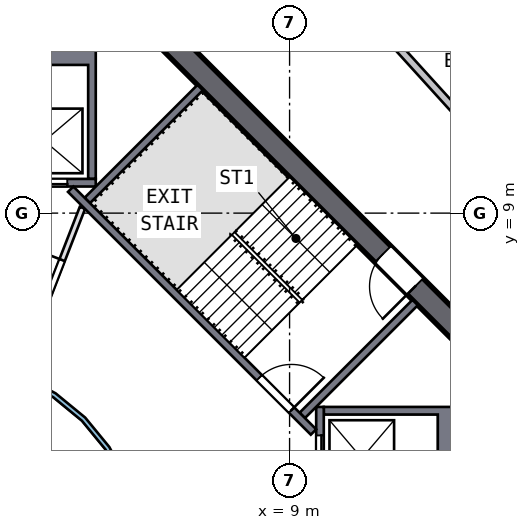
"""IFC4 building model, lengths in metres.
Left out: names, types, materials, properties, quantities, classifications, styles, units other than length and angle.
Written with IfcOpenShell. Run it as: python <this file> out.ifc"""

import sys

from ifc_helpers import new_model, si_unit, direction, frame, frame_2d, origin, place, context, subcontext, project, spatial, polyline, rectangle, outline, extrude, element, fill, save


model = new_model("IFC4")
c1 = context("Model", 3, precision=1e-05, world=origin(), true_north=direction((0.0, 1.0)))
c2 = subcontext(c1, "Body", "Model", "MODEL_VIEW")
j1 = project(units=[si_unit("LENGTHUNIT", "METRE"), si_unit("PLANEANGLEUNIT", "RADIAN")], contexts=[c1])
p1 = place(None, origin())
s1 = spatial("IfcSite", under=j1, at=p1, CompositionType="ELEMENT")
p2 = place(p1, origin())
s2 = spatial("IfcBuilding", under=s1, at=p2, CompositionType="ELEMENT")
p3 = place(p2, frame((0.0, 0.0, 205.5)))
s3 = spatial("IfcBuildingStorey", under=s2, at=p3, CompositionType="ELEMENT", Elevation=205.5)
p4 = place(p3, frame((13.788, 5.587, 0.0), z_axis=(0.0, 0.0, 1.0), x_axis=(-0.707106781, 0.707106781, 0.0)))
e1 = element("IfcWall", 1, at=p4, inside=s3, PredefinedType="SHEAR", context=c2, shape_type="SweptSolid", body=[
    extrude(rectangle(XDim=11.598, YDim=0.6, at=frame_2d((5.799, 0.0))), origin(), (0.0, 0.0, 1.0), 3.5),
])
p5 = place(p4, frame((2.099, 0.0, 0.0)))
e2 = element("IfcOpeningElement", 2, at=p5, cuts=e1, PredefinedType="OPENING", context=c2, shape_type="SweptSolid", body=[
    extrude(rectangle(XDim=1.2, YDim=2.1, at=frame_2d((0.6, 1.05))), frame((0.0, 0.31, 0.0), z_axis=(0.0, -1.0, 0.0), x_axis=(1.0, 0.0, 0.0)), (0.0, 0.0, 1.0), 0.62),
])
p6 = place(p3, origin())
e3 = element("IfcWall", 3, at=p6, inside=s3, PredefinedType="SOLIDWALL", context=c2, shape_type="SweptSolid", body=[
    extrude(outline(polyline([(13.4, 3.9), (13.4, 1.2), (9.9, 1.2), (9.9, 1.4), (12.9, 1.4), (12.9, 3.7), (9.9, 3.7), (9.9, 3.9), (13.4, 3.9)])), origin(), (0.0, 0.0, 1.0), 3.19),
])
p7 = place(p3, frame((9.8, 1.2, 0.0), z_axis=(0.0, 0.0, 1.0), x_axis=(0.0, 1.0, 0.0)))
e4 = element("IfcWall", 4, at=p7, inside=s3, PredefinedType="SOLIDWALL", context=c2, shape_type="SweptSolid", body=[
    extrude(rectangle(XDim=2.7, YDim=0.2, at=frame_2d((1.35, 0.0))), origin(), (0.0, 0.0, 1.0), 3.19),
])
p8 = place(p7, frame((0.75, 0.0, 0.0)))
e5 = element("IfcOpeningElement", 5, at=p8, cuts=e4, PredefinedType="OPENING", context=c2, shape_type="SweptSolid", body=[
    extrude(rectangle(XDim=1.2, YDim=2.1, at=frame_2d((0.6, 1.05))), frame((0.0, 0.11, 0.0), z_axis=(0.0, -1.0, 0.0), x_axis=(1.0, 0.0, 0.0)), (0.0, 0.0, 1.0), 0.22),
])
p9 = place(p3, origin())
e6 = element("IfcWall", 6, at=p9, inside=s3, PredefinedType="SOLIDWALL", context=c2, shape_type="SweptSolid", body=[
    extrude(outline(polyline([(3.9, 9.9), (3.7, 9.9), (3.7, 12.9), (1.4, 12.9), (1.4, 9.9), (1.2, 9.9), (1.2, 13.4), (3.9, 13.4), (3.9, 9.9)])), origin(), (0.0, 0.0, 1.0), 3.19),
])
p10 = place(p3, frame((1.2, 9.8, 0.0), z_axis=(0.0, 0.0, 1.0), x_axis=(1.0, 0.0, 0.0)))
e7 = element("IfcWall", 7, at=p10, inside=s3, PredefinedType="SOLIDWALL", context=c2, shape_type="SweptSolid", body=[
    extrude(rectangle(XDim=2.7, YDim=0.2, at=frame_2d((1.35, 0.0))), origin(), (0.0, 0.0, 1.0), 3.19),
])
p11 = place(p10, frame((0.75, 0.0, 0.0)))
e8 = element("IfcOpeningElement", 8, at=p11, cuts=e7, PredefinedType="OPENING", context=c2, shape_type="SweptSolid", body=[
    extrude(rectangle(XDim=1.2, YDim=2.1, at=frame_2d((0.6, 1.05))), frame((0.0, 0.11, 0.0), z_axis=(0.0, -1.0, 0.0), x_axis=(1.0, 0.0, 0.0)), (0.0, 0.0, 1.0), 0.22),
])
p12 = place(p3, frame((3.24, 9.629, 0.0), z_axis=(0.0, 0.0, 1.0), x_axis=(0.707106781, -0.707106781, 0.0)))
e9 = element("IfcWall", 9, at=p12, inside=s3, PredefinedType="SOLIDWALL", context=c2, shape_type="SweptSolid", body=[
    extrude(rectangle(XDim=9.036, YDim=0.2, at=frame_2d((4.518, 0.0))), origin(), (0.0, 0.0, 1.0), 3.19),
])
p13 = place(p12, frame((7.018, 0.0, 0.0)))
e10 = element("IfcOpeningElement", 10, at=p13, cuts=e9, PredefinedType="OPENING", context=c2, shape_type="SweptSolid", body=[
    extrude(rectangle(XDim=1.2, YDim=2.1, at=frame_2d((0.6, 1.05))), frame((0.0, 0.11, 0.0), z_axis=(0.0, -1.0, 0.0), x_axis=(1.0, 0.0, 0.0)), (0.0, 0.0, 1.0), 0.22),
])
for number, where, z_axis, x_axis in (
    (11, (9.334, 3.677, 0.0), (0.0, 0.0, 1.0), (0.707, 0.707, 0.0)),
    (12, (3.677, 9.334, 0.0), (0.0, 0.0, 1.0), (0.707, 0.707, 0.0)),
):
    element("IfcWall", number, at=place(p3, frame(where, z_axis=z_axis, x_axis=x_axis)), inside=s3, PredefinedType="SOLIDWALL", context=c2, shape_type="SweptSolid", body=[
        extrude(rectangle(XDim=4.2, YDim=0.2, at=frame_2d((2.1, 0.0))), origin(), (0.0, 0.0, 1.0), 3.19),
    ])
p14 = place(p3, frame((1.857, 4.782, 0.0), z_axis=(0.0, 0.0, 1.0), x_axis=(0.362053096, 0.932157474, 0.0)))
e13 = element("IfcWall", 13, at=p14, inside=s3, PredefinedType="PARTITIONING", context=c2, shape_type="SweptSolid", body=[
    extrude(rectangle(XDim=4.675, YDim=0.15, at=frame_2d((2.337, 0.0))), origin(), (0.0, 0.0, 1.0), 3.19),
])
p15 = place(p14, frame((1.4, 0.0, 0.0)))
e14 = element("IfcOpeningElement", 14, at=p15, cuts=e13, PredefinedType="OPENING", context=c2, shape_type="SweptSolid", body=[
    extrude(rectangle(XDim=1.8, YDim=2.1, at=frame_2d((0.9, 1.05))), frame((0.0, 0.085, 0.0), z_axis=(0.0, -1.0, 0.0), x_axis=(1.0, 0.0, 0.0)), (0.0, 0.0, 1.0), 0.17),
])
p16 = place(p3, origin())
e15 = element("IfcWall", 15, at=p16, inside=s3, PredefinedType="SOLIDWALL", context=c2, shape_type="SweptSolid", body=[
    extrude(outline(polyline([(5.021, -0.999), (4.73, -1.959), (4.257, -2.844), (3.62, -3.62), (2.844, -4.257), (1.959, -4.73), (0.999, -5.021), (0.0, -5.12), (-0.999, -5.021), (-1.959, -4.73), (-2.844, -4.257), (-3.62, -3.62), (-4.257, -2.844), (-4.73, -1.959), (-5.021, -0.999), (-5.12, 0.0), (-5.021, 0.999), (-4.73, 1.959), (-4.257, 2.844), (-3.62, 3.62), (-2.844, 4.257), (-1.959, 4.73), (-0.999, 5.021), (0.0, 5.12), (0.999, 5.021), (1.959, 4.73), (2.844, 4.257), (3.62, 3.62), (4.257, 2.844), (4.73, 1.959), (5.021, 0.999), (5.12, 0.0), (5.021, -0.999)]), holes=[polyline([(4.904, 0.976), (4.619, 1.913), (4.157, 2.778), (3.535, 3.535), (2.778, 4.157), (1.913, 4.619), (0.976, 4.904), (0.0, 5.0), (-0.976, 4.904), (-1.913, 4.619), (-2.778, 4.157), (-3.535, 3.535), (-4.157, 2.778), (-4.619, 1.913), (-4.904, 0.976), (-5.0, 0.0), (-4.904, -0.976), (-4.619, -1.913), (-4.157, -2.778), (-3.535, -3.535), (-2.778, -4.157), (-1.913, -4.619), (-0.976, -4.904), (0.0, -5.0), (0.976, -4.904), (1.913, -4.619), (2.778, -4.157), (3.535, -3.535), (4.157, -2.778), (4.619, -1.913), (4.904, -0.976), (5.0, 0.0), (4.904, 0.976)])]), origin(), (0.0, 0.0, 1.0), 3.19),
])
p17 = place(p3, frame((9.948, 15.46, 0.0), z_axis=(0.0, 0.0, 1.0), x_axis=(0.672246163, -0.740327695, 0.0)))
e16 = element("IfcWall", 16, at=p17, inside=s3, PredefinedType="SOLIDWALL", context=c2, shape_type="SweptSolid", body=[
    extrude(rectangle(XDim=9.316, YDim=0.2, at=frame_2d((4.658, 0.0))), origin(), (0.0, 0.0, 1.0), 3.19),
])
p18 = place(p17, frame((5.15, 0.0, 0.0)))
e17 = element("IfcOpeningElement", 17, at=p18, cuts=e16, PredefinedType="OPENING", context=c2, shape_type="SweptSolid", body=[
    extrude(rectangle(XDim=1.0, YDim=2.1, at=frame_2d((0.5, 1.05))), frame((0.0, 0.11, 0.0), z_axis=(0.0, -1.0, 0.0), x_axis=(1.0, 0.0, 0.0)), (0.0, 0.0, 1.0), 0.22),
])
p19 = place(p8, origin())
e18 = element("IfcDoor", 18, at=p19, inside=s3, OperationType="DOUBLE_DOOR_SLIDING", PredefinedType="DOOR", context=c2, shape_type="SweptSolid", body=[
    extrude(rectangle(XDim=1.2, YDim=2.1, at=frame_2d((0.6, 1.05))), frame((0.0, 0.025, 0.0), z_axis=(0.0, -1.0, 0.0), x_axis=(1.0, 0.0, 0.0)), (0.0, 0.0, 1.0), 0.05),
])
fill(e5, e18)
p20 = place(p11, origin())
e19 = element("IfcDoor", 19, at=p20, inside=s3, OperationType="DOUBLE_DOOR_SLIDING", PredefinedType="DOOR", context=c2, shape_type="SweptSolid", body=[
    extrude(rectangle(XDim=1.2, YDim=2.1, at=frame_2d((0.6, 1.05))), frame((0.0, 0.025, 0.0), z_axis=(0.0, -1.0, 0.0), x_axis=(1.0, 0.0, 0.0)), (0.0, 0.0, 1.0), 0.05),
])
fill(e8, e19)
p21 = place(p13, origin())
e20 = element("IfcDoor", 20, at=p21, inside=s3, OperationType="SINGLE_SWING_RIGHT", PredefinedType="DOOR", context=c2, shape_type="SweptSolid", body=[
    extrude(rectangle(XDim=1.2, YDim=2.1, at=frame_2d((0.6, 1.05))), frame((0.0, 0.025, 0.0), z_axis=(0.0, -1.0, 0.0), x_axis=(1.0, 0.0, 0.0)), (0.0, 0.0, 1.0), 0.05),
])
fill(e10, e20)
p22 = place(p5, origin())
e21 = element("IfcDoor", 21, at=p22, inside=s3, OperationType="SINGLE_SWING_LEFT", PredefinedType="DOOR", context=c2, shape_type="SweptSolid", body=[
    extrude(rectangle(XDim=1.2, YDim=2.1, at=frame_2d((0.6, 1.05))), frame((0.0, 0.025, 0.0), z_axis=(0.0, -1.0, 0.0), x_axis=(1.0, 0.0, 0.0)), (0.0, 0.0, 1.0), 0.05),
])
fill(e2, e21)
p23 = place(p15, origin())
e22 = element("IfcDoor", 22, at=p23, inside=s3, OperationType="DOUBLE_DOOR_SINGLE_SWING", PredefinedType="DOOR", context=c2, shape_type="SweptSolid", body=[
    extrude(rectangle(XDim=1.8, YDim=2.1, at=frame_2d((0.9, 1.05))), frame((0.0, 0.025, 0.0), z_axis=(0.0, -1.0, 0.0), x_axis=(1.0, 0.0, 0.0)), (0.0, 0.0, 1.0), 0.05),
])
fill(e14, e22)
save(model, sys.argv[1])
